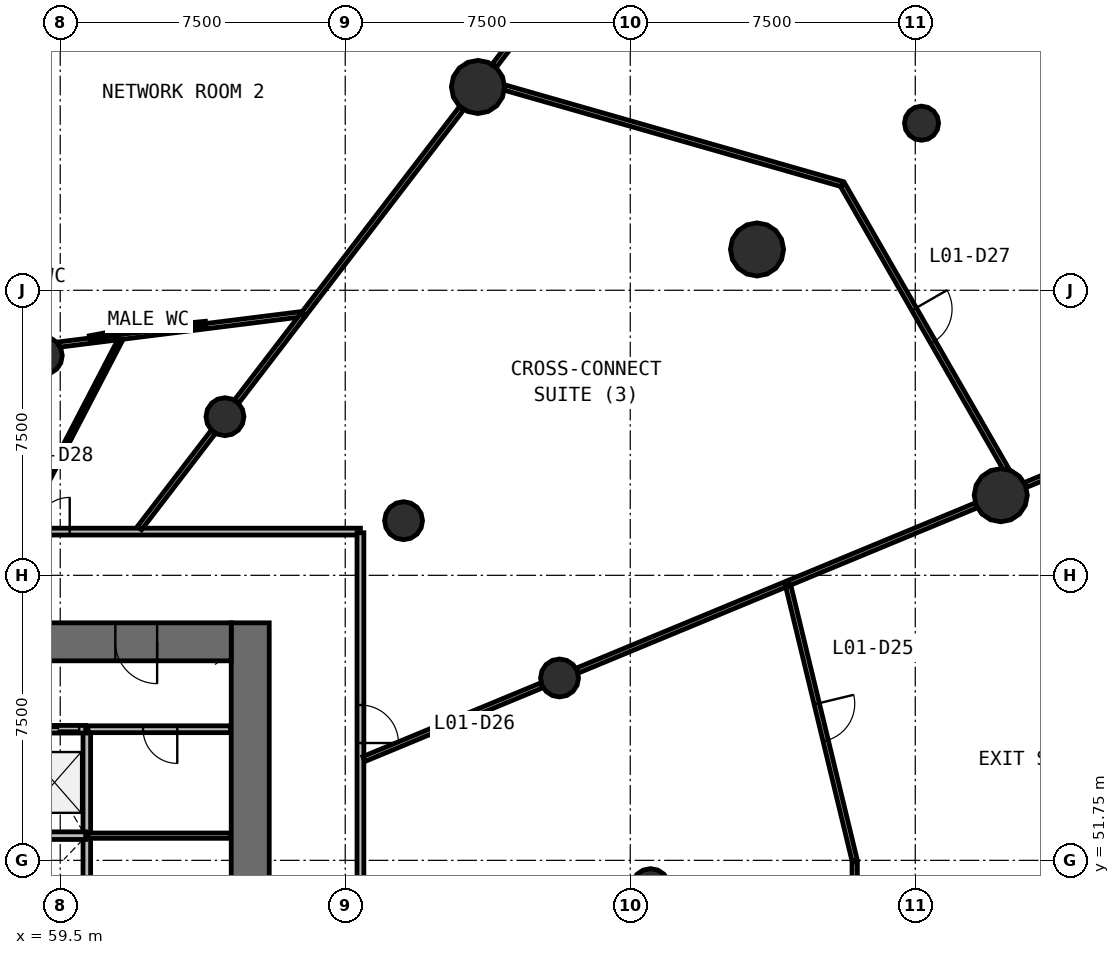
"""IFC4 building model, lengths in metres.
Left out: names, types, materials, properties, quantities, classifications, styles, units other than length and angle.
Written with IfcOpenShell. Run it as: python <this file> out.ifc"""

import sys

from ifc_helpers import new_model, si_unit, direction, frame, frame_2d, origin, origin_2d, place, context, subcontext, project, spatial, rectangle, circle, extrude, source, transform, mapped, element, fill, save


model = new_model("IFC4")
c1 = context("Model", 3, precision=1e-05, world=origin(), true_north=direction((0.0, 1.0)))
c2 = subcontext(c1, "Body", "Model", "MODEL_VIEW")
j1 = project(units=[si_unit("LENGTHUNIT", "METRE"), si_unit("PLANEANGLEUNIT", "RADIAN")], contexts=[c1])
p1 = place(None, origin())
s1 = spatial("IfcSite", under=j1, at=p1, CompositionType="ELEMENT")
p2 = place(p1, origin())
s2 = spatial("IfcBuilding", under=s1, at=p2, CompositionType="ELEMENT")
p3 = place(p2, frame((0.0, 0.0, 5.0)))
s3 = spatial("IfcBuildingStorey", under=s2, at=p3, CompositionType="ELEMENT", Elevation=5.0)
p4 = place(p3, frame((64.5, 38.0, 0.0), z_axis=(0.0, 0.0, 1.0), x_axis=(0.0, 1.0, 0.0)))
e1 = element("IfcWall", 1, at=p4, inside=s3, PredefinedType="SHEAR", context=c2, shape_type="SweptSolid", body=[
    extrude(rectangle(XDim=20.0, YDim=1.0, at=frame_2d((10.0, 0.0))), origin(), (0.0, 0.0, 1.0), 4.4),
])
p5 = place(p4, frame((9.1, 0.0, 0.0)))
e2 = element("IfcOpeningElement", 2, at=p5, cuts=e1, PredefinedType="OPENING", context=c2, shape_type="SweptSolid", body=[
    extrude(rectangle(XDim=1.8, YDim=2.1, at=frame_2d((0.9, 1.05))), frame((0.0, 0.51, 0.0), z_axis=(0.0, -1.0, 0.0), x_axis=(1.0, 0.0, 0.0)), (0.0, 0.0, 1.0), 1.02),
])
p6 = place(p3, frame((64.0, 57.5, 0.0), z_axis=(0.0, 0.0, 1.0), x_axis=(-1.0, 0.0, 0.0)))
e3 = element("IfcWall", 3, at=p6, inside=s3, PredefinedType="SHEAR", context=c2, shape_type="SweptSolid", body=[
    extrude(rectangle(XDim=24.0, YDim=1.0, at=frame_2d((12.0, 0.0))), origin(), (0.0, 0.0, 1.0), 4.4),
])
p7 = place(p6, frame((21.45, 0.0, 0.0)))
e4 = element("IfcOpeningElement", 4, at=p7, cuts=e3, PredefinedType="OPENING", context=c2, shape_type="SweptSolid", body=[
    extrude(rectangle(XDim=1.1, YDim=2.1, at=frame_2d((0.55, 1.05))), frame((0.0, 0.51, 0.0), z_axis=(0.0, -1.0, 0.0), x_axis=(1.0, 0.0, 0.0)), (0.0, 0.0, 1.0), 1.02),
])
p8 = place(p6, frame((1.95, 0.0, 0.0)))
e5 = element("IfcOpeningElement", 5, at=p8, cuts=e3, PredefinedType="OPENING", context=c2, shape_type="SweptSolid", body=[
    extrude(rectangle(XDim=1.1, YDim=2.1, at=frame_2d((0.55, 1.05))), frame((0.0, 0.51, 0.0), z_axis=(0.0, -1.0, 0.0), x_axis=(1.0, 0.0, 0.0)), (0.0, 0.0, 1.0), 1.02),
])
m1 = source(origin(), c2, "Body", "SweptSolid", [
    extrude(circle(Radius=0.7, at=origin_2d()), origin(), (0.0, 0.0, 1.0), 4.4),
])
for number, where, z_axis, x_axis in (
    (6, (84.249, 61.358, 0.0), (0.0, 0.0, 1.0), (1.0, 0.0, 0.0)),
    (7, (77.836, 67.824, 0.0), (0.0, 0.0, 1.0), (1.0, 0.0, 0.0)),
    (8, (70.492, 72.1, 0.0), (0.0, 0.0, 1.0), (1.0, 0.0, 0.0)),
):
    element("IfcColumn", number, at=place(p3, frame(where, z_axis=z_axis, x_axis=x_axis)), inside=s3, PredefinedType="COLUMN", context=c2, shape_type="MappedRepresentation", body=[
        mapped(m1, transform((0.0, 0.0, 0.0), scale=1.0)),
    ])
m2 = source(origin(), c2, "Body", "SweptSolid", [
    extrude(circle(Radius=0.5, at=origin_2d()), origin(), (0.0, 0.0, 1.0), 4.4),
])
for number, where, z_axis, x_axis in (
    (9, (75.034, 51.032, 0.0), (0.0, 0.0, 1.0), (1.0, 0.0, 0.0)),
    (10, (72.639, 56.549, 0.0), (0.0, 0.0, 1.0), (1.0, 0.0, 0.0)),
    (11, (68.535, 60.688, 0.0), (0.0, 0.0, 1.0), (1.0, 0.0, 0.0)),
    (12, (63.835, 63.424, 0.0), (0.0, 0.0, 1.0), (1.0, 0.0, 0.0)),
    (13, (59.055, 65.031, 0.0), (0.0, 0.0, 1.0), (1.0, 0.0, 0.0)),
):
    element("IfcColumn", number, at=place(p3, frame(where, z_axis=z_axis, x_axis=x_axis)), inside=s3, PredefinedType="COLUMN", context=c2, shape_type="MappedRepresentation", body=[
        mapped(m2, transform((0.0, 0.0, 0.0), scale=1.0)),
    ])
m3 = source(origin(), c2, "Body", "SweptSolid", [
    extrude(circle(Radius=0.45, at=origin_2d()), origin(), (0.0, 0.0, 1.0), 4.4),
])
p9 = place(p3, frame((82.165, 71.146, 0.0), z_axis=(0.0, 0.0, 1.0), x_axis=(1.0, 0.0, 0.0)))
e14 = element("IfcColumn", 14, at=p9, inside=s3, PredefinedType="COLUMN", context=c2, shape_type="MappedRepresentation", body=[
    mapped(m3, transform((0.0, 0.0, 0.0), scale=1.0)),
])
p10 = place(p3, frame((60.2, 52.4, 0.0), z_axis=(0.0, 0.0, 1.0), x_axis=(0.0, 1.0, 0.0)))
e15 = element("IfcWall", 15, at=p10, inside=s3, PredefinedType="SOLIDWALL", context=c2, shape_type="SweptSolid", body=[
    extrude(rectangle(XDim=2.8, YDim=0.2, at=frame_2d((1.4, 0.0))), origin(), (0.0, 0.0, 1.0), 4.05),
])
p11 = place(p3, frame((60.2, 50.01, 0.0), z_axis=(0.0, 0.0, 1.0), x_axis=(0.0, 1.0, 0.0)))
e16 = element("IfcWall", 16, at=p11, inside=s3, PredefinedType="SOLIDWALL", context=c2, shape_type="SweptSolid", body=[
    extrude(rectangle(XDim=2.36, YDim=0.2, at=frame_2d((1.18, 0.0))), origin(), (0.0, 0.0, 1.0), 4.05),
])
p12 = place(p3, frame((60.17, 52.4, 0.0), z_axis=(0.0, 0.0, 1.0), x_axis=(-1.0, 0.0, 0.0)))
e17 = element("IfcWall", 17, at=p12, inside=s3, PredefinedType="SOLIDWALL", context=c2, shape_type="SweptSolid", body=[
    extrude(rectangle(XDim=1.64, YDim=0.2, at=frame_2d((0.82, 0.0))), origin(), (0.0, 0.0, 1.0), 4.05),
])
p13 = place(p3, frame((60.17, 55.2, 0.0), z_axis=(0.0, 0.0, 1.0), x_axis=(-1.0, 0.0, 0.0)))
e18 = element("IfcWall", 18, at=p13, inside=s3, PredefinedType="SOLIDWALL", context=c2, shape_type="SweptSolid", body=[
    extrude(rectangle(XDim=1.64, YDim=0.2, at=frame_2d((0.82, 0.0))), origin(), (0.0, 0.0, 1.0), 4.05),
])
p14 = place(p13, frame((0.17, 0.0, 0.0)))
e19 = element("IfcOpeningElement", 19, at=p14, cuts=e18, PredefinedType="OPENING", context=c2, shape_type="SweptSolid", body=[
    extrude(rectangle(XDim=1.1, YDim=2.1, at=frame_2d((0.55, 1.05))), frame((0.0, 0.11, 0.0), z_axis=(0.0, -1.0, 0.0), x_axis=(1.0, 0.0, 0.0)), (0.0, 0.0, 1.0), 0.22),
])
p15 = place(p3, frame((36.6, 60.4, 0.0), z_axis=(0.0, 0.0, 1.0), x_axis=(1.0, 0.0, 0.0)))
e20 = element("IfcWall", 20, at=p15, inside=s3, PredefinedType="PARTITIONING", context=c2, shape_type="SweptSolid", body=[
    extrude(rectangle(XDim=30.8, YDim=0.18, at=frame_2d((15.4, 0.0))), origin(), (0.0, 0.0, 1.0), 3.25),
])
p16 = place(p15, frame((22.25, 0.0, 0.0)))
e21 = element("IfcOpeningElement", 21, at=p16, cuts=e20, PredefinedType="OPENING", context=c2, shape_type="SweptSolid", body=[
    extrude(rectangle(XDim=0.9, YDim=2.1, at=frame_2d((0.45, 1.05))), frame((0.0, 0.1, 0.0), z_axis=(0.0, -1.0, 0.0), x_axis=(1.0, 0.0, 0.0)), (0.0, 0.0, 1.0), 0.2),
])
p17 = place(p15, frame((19.65, 0.0, 0.0)))
e22 = element("IfcOpeningElement", 22, at=p17, cuts=e20, PredefinedType="OPENING", context=c2, shape_type="SweptSolid", body=[
    extrude(rectangle(XDim=0.9, YDim=2.1, at=frame_2d((0.45, 1.05))), frame((0.0, 0.1, 0.0), z_axis=(0.0, -1.0, 0.0), x_axis=(1.0, 0.0, 0.0)), (0.0, 0.0, 1.0), 0.2),
])
p18 = place(p15, frame((17.25, 0.0, 0.0)))
e23 = element("IfcOpeningElement", 23, at=p18, cuts=e20, PredefinedType="OPENING", context=c2, shape_type="SweptSolid", body=[
    extrude(rectangle(XDim=0.9, YDim=2.1, at=frame_2d((0.45, 1.05))), frame((0.0, 0.1, 0.0), z_axis=(0.0, -1.0, 0.0), x_axis=(1.0, 0.0, 0.0)), (0.0, 0.0, 1.0), 0.2),
])
p19 = place(p15, frame((14.95, 0.0, 0.0)))
e24 = element("IfcOpeningElement", 24, at=p19, cuts=e20, PredefinedType="OPENING", context=c2, shape_type="SweptSolid", body=[
    extrude(rectangle(XDim=1.0, YDim=2.1, at=frame_2d((0.5, 1.05))), frame((0.0, 0.1, 0.0), z_axis=(0.0, -1.0, 0.0), x_axis=(1.0, 0.0, 0.0)), (0.0, 0.0, 1.0), 0.2),
])
p20 = place(p3, frame((67.4, 60.37, 0.0), z_axis=(0.0, 0.0, 1.0), x_axis=(0.0, -1.0, 0.0)))
e25 = element("IfcWall", 25, at=p20, inside=s3, PredefinedType="PARTITIONING", context=c2, shape_type="SweptSolid", body=[
    extrude(rectangle(XDim=23.583, YDim=0.18, at=frame_2d((11.791, 0.0))), origin(), (0.0, 0.0, 1.0), 3.25),
])
p21 = place(p20, frame((11.333, 0.0, 0.0)))
e26 = element("IfcOpeningElement", 26, at=p21, cuts=e25, PredefinedType="OPENING", context=c2, shape_type="SweptSolid", body=[
    extrude(rectangle(XDim=1.0, YDim=2.1, at=frame_2d((0.5, 1.05))), frame((0.0, 0.1, 0.0), z_axis=(0.0, -1.0, 0.0), x_axis=(1.0, 0.0, 0.0)), (0.0, 0.0, 1.0), 0.2),
])
p22 = place(p20, frame((4.532, 0.0, 0.0)))
e27 = element("IfcOpeningElement", 27, at=p22, cuts=e25, PredefinedType="OPENING", context=c2, shape_type="SweptSolid", body=[
    extrude(rectangle(XDim=1.0, YDim=2.1, at=frame_2d((0.5, 1.05))), frame((0.0, 0.1, 0.0), z_axis=(0.0, -1.0, 0.0), x_axis=(1.0, 0.0, 0.0)), (0.0, 0.0, 1.0), 0.2),
])
p23 = place(p20, frame((19.133, 0.0, 0.0)))
e28 = element("IfcOpeningElement", 28, at=p23, cuts=e25, PredefinedType="OPENING", context=c2, shape_type="SweptSolid", body=[
    extrude(rectangle(XDim=1.0, YDim=2.1, at=frame_2d((0.5, 1.05))), frame((0.0, 0.1, 0.0), z_axis=(0.0, -1.0, 0.0), x_axis=(1.0, 0.0, 0.0)), (0.0, 0.0, 1.0), 0.2),
])
p24 = place(p3, frame((63.98, 55.2, 0.0), z_axis=(0.0, 0.0, 1.0), x_axis=(-1.0, 0.0, 0.0)))
e29 = element("IfcWall", 29, at=p24, inside=s3, PredefinedType="PARTITIONING", context=c2, shape_type="SweptSolid", body=[
    extrude(rectangle(XDim=3.75, YDim=0.18, at=frame_2d((1.875, 0.0))), origin(), (0.0, 0.0, 1.0), 4.05),
])
p25 = place(p24, frame((1.4, 0.0, 0.0)))
e30 = element("IfcOpeningElement", 30, at=p25, cuts=e29, PredefinedType="OPENING", context=c2, shape_type="SweptSolid", body=[
    extrude(rectangle(XDim=0.9, YDim=2.1, at=frame_2d((0.45, 1.05))), frame((0.0, 0.1, 0.0), z_axis=(0.0, -1.0, 0.0), x_axis=(1.0, 0.0, 0.0)), (0.0, 0.0, 1.0), 0.2),
])
p26 = place(p3, frame((80.076, 69.544, 0.0), z_axis=(0.0, 0.0, 1.0), x_axis=(-0.961447102661, 0.27498994306, 0.0)))
e31 = element("IfcWall", 31, at=p26, inside=s3, PredefinedType="PARTITIONING", context=c2, shape_type="SweptSolid", body=[
    extrude(rectangle(XDim=9.236, YDim=0.14, at=frame_2d((4.618, 0.0))), origin(), (0.0, 0.0, 1.0), 3.25),
])
p27 = place(p3, frame((80.091, 69.518, 0.0), z_axis=(0.0, 0.0, 1.0), x_axis=(0.498474851257, -0.866904160023, 0.0)))
e32 = element("IfcWall", 32, at=p27, inside=s3, PredefinedType="PARTITIONING", context=c2, shape_type="SweptSolid", body=[
    extrude(rectangle(XDim=8.615, YDim=0.14, at=frame_2d((4.308, 0.0))), origin(), (0.0, 0.0, 1.0), 3.25),
])
p28 = place(p27, frame((3.765, 0.0, 0.0)))
e33 = element("IfcOpeningElement", 33, at=p28, cuts=e32, PredefinedType="OPENING", context=c2, shape_type="SweptSolid", body=[
    extrude(rectangle(XDim=1.0, YDim=2.1, at=frame_2d((0.5, 1.05))), frame((0.0, 0.08, 0.0), z_axis=(0.0, -1.0, 0.0), x_axis=(1.0, 0.0, 0.0)), (0.0, 0.0, 1.0), 0.16),
])
p29 = place(p3, frame((78.642, 59.035, 0.0), z_axis=(0.0, 0.0, 1.0), x_axis=(0.235066566732, -0.971979274061, 0.0)))
e34 = element("IfcWall", 34, at=p29, inside=s3, PredefinedType="PARTITIONING", context=c2, shape_type="SweptSolid", body=[
    extrude(rectangle(XDim=7.506, YDim=0.14, at=frame_2d((3.753, 0.0))), origin(), (0.0, 0.0, 1.0), 3.25),
])
p30 = place(p29, frame((3.256, 0.0, 0.0)))
e35 = element("IfcOpeningElement", 35, at=p30, cuts=e34, PredefinedType="OPENING", context=c2, shape_type="SweptSolid", body=[
    extrude(rectangle(XDim=1.0, YDim=2.1, at=frame_2d((0.5, 1.05))), frame((0.0, 0.08, 0.0), z_axis=(0.0, -1.0, 0.0), x_axis=(1.0, 0.0, 0.0)), (0.0, 0.0, 1.0), 0.16),
])
p31 = place(p3, frame((80.406, 44.29, 0.0), z_axis=(0.0, 0.0, 1.0), x_axis=(0.0, 1.0, 0.0)))
e36 = element("IfcWall", 36, at=p31, inside=s3, PredefinedType="PARTITIONING", context=c2, shape_type="SweptSolid", body=[
    extrude(rectangle(XDim=7.419, YDim=0.14, at=frame_2d((3.71, 0.0))), origin(), (0.0, 0.0, 1.0), 3.25),
])
p32 = place(p3, frame((70.921, 72.658, 0.0), z_axis=(0.0, 0.0, 1.0), x_axis=(0.608788506125, 0.793332562555, 0.0)))
e37 = element("IfcWall", 37, at=p32, inside=s3, PredefinedType="PARTITIONING", context=c2, shape_type="SweptSolid", body=[
    extrude(rectangle(XDim=6.963, YDim=0.14, at=frame_2d((3.481, 0.0))), origin(), (0.0, 0.0, 1.0), 3.25),
])
p33 = place(p32, frame((3.05, 0.0, 0.0)))
e38 = element("IfcOpeningElement", 38, at=p33, cuts=e37, PredefinedType="OPENING", context=c2, shape_type="SweptSolid", body=[
    extrude(rectangle(XDim=1.0, YDim=2.1, at=frame_2d((0.5, 1.05))), frame((0.0, 0.08, 0.0), z_axis=(0.0, -1.0, 0.0), x_axis=(1.0, 0.0, 0.0)), (0.0, 0.0, 1.0), 0.16),
])
p34 = place(p3, frame((65.909, 66.127, 0.0), z_axis=(0.0, 0.0, 1.0), x_axis=(0.608773229352, 0.79334428543, 0.0)))
e39 = element("IfcWall", 39, at=p34, inside=s3, PredefinedType="PARTITIONING", context=c2, shape_type="SweptSolid", body=[
    extrude(rectangle(XDim=6.824, YDim=0.14, at=frame_2d((3.412, 0.0))), origin(), (0.0, 0.0, 1.0), 3.25),
])
p35 = place(p3, frame((65.88, 66.124, 0.0), z_axis=(0.0, 0.0, 1.0), x_axis=(-0.992269737838, -0.124099828249, 0.0)))
e40 = element("IfcWall", 40, at=p35, inside=s3, PredefinedType="PARTITIONING", context=c2, shape_type="SweptSolid", body=[
    extrude(rectangle(XDim=6.463, YDim=0.14, at=frame_2d((3.231, 0.0))), origin(), (0.0, 0.0, 1.0), 3.25),
])
p36 = place(p3, frame((73.106, 56.742, 0.0), z_axis=(0.0, 0.0, 1.0), x_axis=(0.923863045068, 0.382723234148, 0.0)))
e41 = element("IfcWall", 41, at=p36, inside=s3, PredefinedType="PARTITIONING", context=c2, shape_type="SweptSolid", body=[
    extrude(rectangle(XDim=5.921, YDim=0.14, at=frame_2d((2.96, 0.0))), origin(), (0.0, 0.0, 1.0), 3.25),
])
p37 = place(p3, frame((78.669, 59.047, 0.0), z_axis=(0.0, 0.0, 1.0), x_axis=(0.923891330959, 0.382654947151, 0.0)))
e42 = element("IfcWall", 42, at=p37, inside=s3, PredefinedType="PARTITIONING", context=c2, shape_type="SweptSolid", body=[
    extrude(rectangle(XDim=5.334, YDim=0.14, at=frame_2d((2.667, 0.0))), origin(), (0.0, 0.0, 1.0), 3.25),
])
p38 = place(p3, frame((67.49, 54.416, 0.0), z_axis=(0.0, 0.0, 1.0), x_axis=(0.923890025086, 0.382658100067, 0.0)))
e43 = element("IfcWall", 43, at=p38, inside=s3, PredefinedType="PARTITIONING", context=c2, shape_type="SweptSolid", body=[
    extrude(rectangle(XDim=5.068, YDim=0.14, at=frame_2d((2.534, 0.0))), origin(), (0.0, 0.0, 1.0), 3.25),
])
p39 = place(p3, frame((84.9, 61.628, 0.0), z_axis=(0.0, 0.0, 1.0), x_axis=(0.923871522787, 0.382702768979, 0.0)))
e44 = element("IfcWall", 44, at=p39, inside=s3, PredefinedType="PARTITIONING", context=c2, shape_type="SweptSolid", body=[
    extrude(rectangle(XDim=4.28, YDim=0.14, at=frame_2d((2.14, 0.0))), origin(), (0.0, 0.0, 1.0), 3.25),
])
p40 = place(p3, frame((63.98, 52.4, 0.0), z_axis=(0.0, 0.0, 1.0), x_axis=(-1.0, 0.0, 0.0)))
e45 = element("IfcWall", 45, at=p40, inside=s3, PredefinedType="PARTITIONING", context=c2, shape_type="SweptSolid", body=[
    extrude(rectangle(XDim=3.75, YDim=0.14, at=frame_2d((1.875, 0.0))), origin(), (0.0, 0.0, 1.0), 3.25),
])
p41 = place(p3, frame((61.584, 60.49, 0.0), z_axis=(0.0, 0.0, 1.0), x_axis=(0.60874605662, 0.793365135703, 0.0)))
e46 = element("IfcWall", 46, at=p41, inside=s3, PredefinedType="PARTITIONING", context=c2, shape_type="SweptSolid", body=[
    extrude(rectangle(XDim=3.194, YDim=0.14, at=frame_2d((1.597, 0.0))), origin(), (0.0, 0.0, 1.0), 3.25),
])
p42 = place(p3, frame((64.142, 63.824, 0.0), z_axis=(0.0, 0.0, 1.0), x_axis=(0.608770075861, 0.793346705253, 0.0)))
e47 = element("IfcWall", 47, at=p42, inside=s3, PredefinedType="PARTITIONING", context=c2, shape_type="SweptSolid", body=[
    extrude(rectangle(XDim=2.861, YDim=0.14, at=frame_2d((1.431, 0.0))), origin(), (0.0, 0.0, 1.0), 3.25),
])
p43 = place(p3, frame((58.502, 60.49, 0.0), z_axis=(0.0, 0.0, 1.0), x_axis=(0.461744214497, 0.887013123002, 0.0)))
e48 = element("IfcWall", 48, at=p43, inside=s3, PredefinedType="PARTITIONING", context=c2, shape_type="SweptSolid", body=[
    extrude(rectangle(XDim=5.596, YDim=0.12, at=frame_2d((2.798, 0.0))), origin(), (0.0, 0.0, 1.0), 3.25),
])
p44 = place(p3, frame((63.328, 65.875, 0.0), z_axis=(0.0, 0.0, 1.0), x_axis=(-0.995247178859, -0.097380968234, 0.0)))
e49 = element("IfcWall", 49, at=p44, inside=s3, PredefinedType="PARTITIONING", context=c2, shape_type="SweptSolid", body=[
    extrude(rectangle(XDim=2.141, YDim=0.12, at=frame_2d((1.071, 0.0))), origin(), (0.0, 0.0, 1.0), 3.25),
])
p45 = place(p3, frame((61.167, 65.661, 0.0), z_axis=(0.0, 0.0, 1.0), x_axis=(-0.982722635862, -0.18508436175, 0.0)))
e50 = element("IfcWall", 50, at=p45, inside=s3, PredefinedType="PARTITIONING", context=c2, shape_type="SweptSolid", body=[
    extrude(rectangle(XDim=0.907, YDim=0.12, at=frame_2d((0.454, 0.0))), origin(), (0.0, 0.0, 1.0), 3.25),
])
m4 = source(origin(), c2, "Body", "SweptSolid", [
    extrude(rectangle(XDim=1.1, YDim=2.1, at=frame_2d((0.55, 1.05))), frame((0.0, 0.025, 0.0), z_axis=(0.0, -1.0, 0.0), x_axis=(1.0, 0.0, 0.0)), (0.0, 0.0, 1.0), 0.05),
])
p46 = place(p14, origin())
e51 = element("IfcDoor", 51, at=p46, inside=s3, OperationType="DOUBLE_DOOR_SLIDING", PredefinedType="USERDEFINED", context=c2, shape_type="MappedRepresentation", body=[
    mapped(m4, transform((0.0, 0.0, 0.0), scale=1.0)),
])
fill(e19, e51)
m5 = source(origin(), c2, "Body", "SweptSolid", [
    extrude(rectangle(XDim=1.1, YDim=2.1, at=frame_2d((0.55, 1.05))), frame((0.0, 0.025, 0.0), z_axis=(0.0, -1.0, 0.0), x_axis=(1.0, 0.0, 0.0)), (0.0, 0.0, 1.0), 0.05),
])
p47 = place(p8, origin())
e52 = element("IfcDoor", 52, at=p47, inside=s3, OperationType="SINGLE_SWING_LEFT", PredefinedType="DOOR", context=c2, shape_type="MappedRepresentation", body=[
    mapped(m5, transform((0.0, 0.0, 0.0), scale=1.0)),
])
fill(e5, e52)
m6 = source(origin(), c2, "Body", "SweptSolid", [
    extrude(rectangle(XDim=1.0, YDim=2.1, at=frame_2d((0.5, 1.05))), frame((0.0, 0.025, 0.0), z_axis=(0.0, -1.0, 0.0), x_axis=(1.0, 0.0, 0.0)), (0.0, 0.0, 1.0), 0.05),
])
p48 = place(p30, origin())
e53 = element("IfcDoor", 53, at=p48, inside=s3, OperationType="SINGLE_SWING_LEFT", PredefinedType="DOOR", context=c2, shape_type="MappedRepresentation", body=[
    mapped(m6, transform((0.0, 0.0, 0.0), scale=1.0)),
])
fill(e35, e53)
p49 = place(p22, origin())
e54 = element("IfcDoor", 54, at=p49, inside=s3, OperationType="SINGLE_SWING_RIGHT", PredefinedType="DOOR", context=c2, shape_type="MappedRepresentation", body=[
    mapped(m6, transform((0.0, 0.0, 0.0), scale=1.0)),
])
fill(e27, e54)
p50 = place(p28, origin())
e55 = element("IfcDoor", 55, at=p50, inside=s3, OperationType="SINGLE_SWING_LEFT", PredefinedType="DOOR", context=c2, shape_type="MappedRepresentation", body=[
    mapped(m6, transform((0.0, 0.0, 0.0), scale=1.0)),
])
fill(e33, e55)
m7 = source(origin(), c2, "Body", "SweptSolid", [
    extrude(rectangle(XDim=0.9, YDim=2.1, at=frame_2d((0.45, 1.05))), frame((0.0, 0.025, 0.0), z_axis=(0.0, -1.0, 0.0), x_axis=(1.0, 0.0, 0.0)), (0.0, 0.0, 1.0), 0.05),
])
p51 = place(p16, origin())
e56 = element("IfcDoor", 56, at=p51, inside=s3, OperationType="SINGLE_SWING_RIGHT", PredefinedType="DOOR", context=c2, shape_type="MappedRepresentation", body=[
    mapped(m7, transform((0.0, 0.0, 0.0), scale=1.0)),
])
fill(e21, e56)
m8 = source(origin(), c2, "Body", "SweptSolid", [
    extrude(rectangle(XDim=0.9, YDim=2.1, at=frame_2d((0.45, 1.05))), frame((0.0, 0.025, 0.0), z_axis=(0.0, -1.0, 0.0), x_axis=(1.0, 0.0, 0.0)), (0.0, 0.0, 1.0), 0.05),
])
p52 = place(p25, origin())
e57 = element("IfcDoor", 57, at=p52, inside=s3, OperationType="SINGLE_SWING_LEFT", PredefinedType="DOOR", context=c2, shape_type="MappedRepresentation", body=[
    mapped(m8, transform((0.0, 0.0, 0.0), scale=1.0)),
])
fill(e30, e57)
save(model, sys.argv[1])
